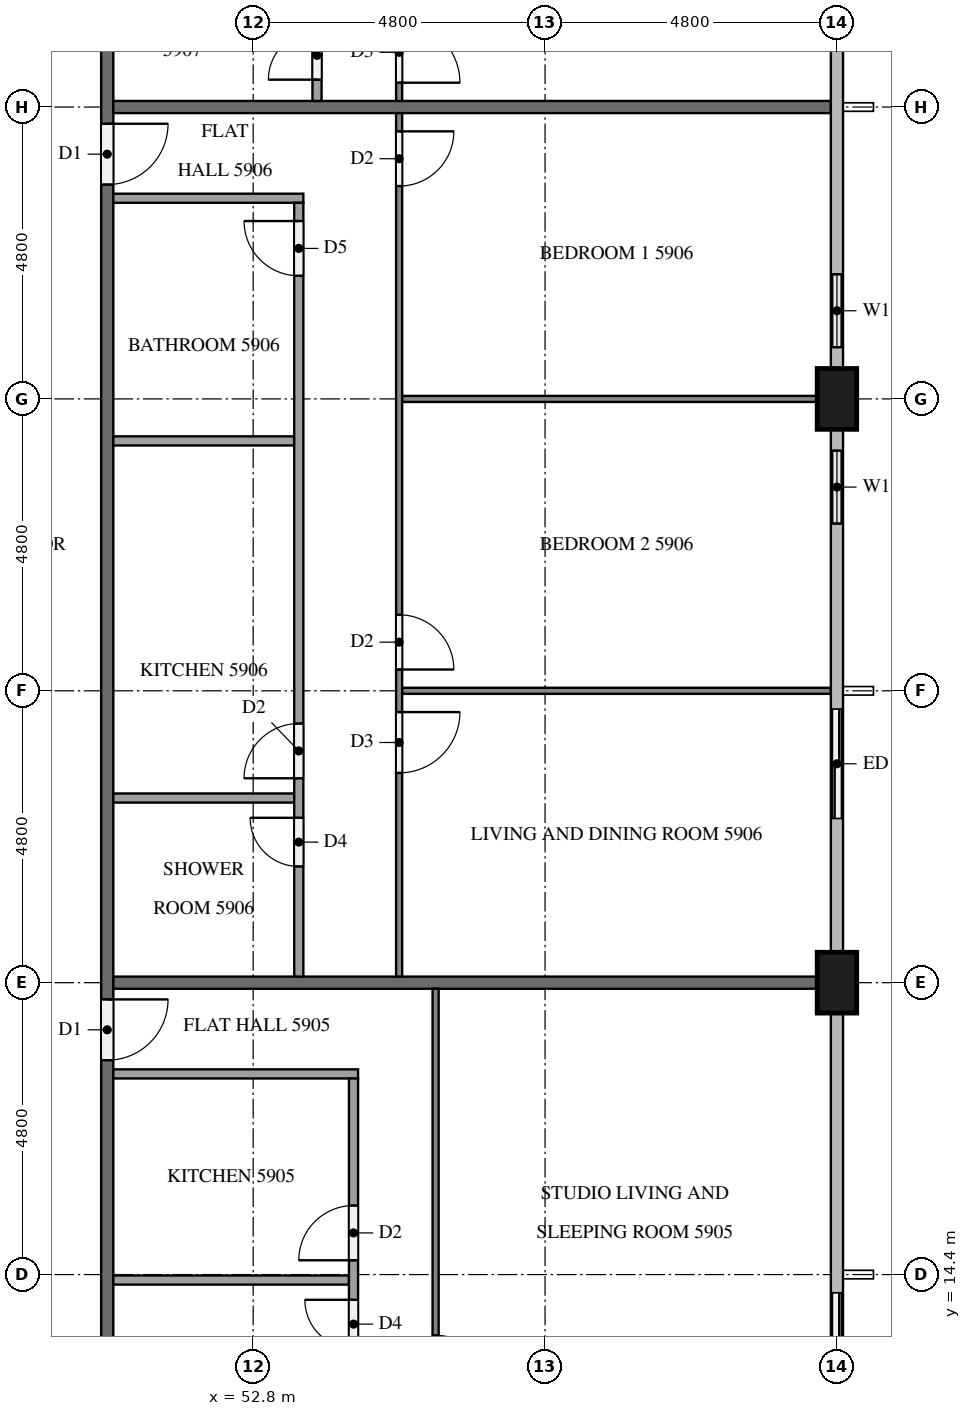
"""IFC4 building model, lengths in metres.
Left out: names, types, materials, properties, quantities, classifications, styles, units other than length and angle.
Written with IfcOpenShell. Run it as: python <this file> out.ifc"""

import sys

from ifc_helpers import new_model, si_unit, direction, frame, frame_2d, origin, origin_2d, place, context, subcontext, project, spatial, rectangle, extrude, element, fill, save


model = new_model("IFC4")
c1 = context("Model", 3, precision=1e-05, world=origin(), true_north=direction((0.0, 1.0)))
c2 = subcontext(c1, "Body", "Model", "MODEL_VIEW")
j1 = project(units=[si_unit("LENGTHUNIT", "METRE"), si_unit("PLANEANGLEUNIT", "RADIAN")], contexts=[c1])
p1 = place(None, origin())
s1 = spatial("IfcSite", under=j1, at=p1, CompositionType="ELEMENT")
p2 = place(p1, origin())
s2 = spatial("IfcBuilding", under=s1, at=p2, CompositionType="ELEMENT")
p3 = place(p2, frame((0.0, 0.0, 226.3)))
s3 = spatial("IfcBuildingStorey", under=s2, at=p3, CompositionType="ELEMENT", Elevation=226.3)
for number, where, z_axis, x_axis in (
    (1, (62.4, 19.2, 0.0), (0.0, 0.0, 1.0), (0.0, 1.0, 0.0)),
    (2, (62.4, 28.8, 0.0), (0.0, 0.0, 1.0), (0.0, 1.0, 0.0)),
):
    element("IfcColumn", number, at=place(p3, frame(where, z_axis=z_axis, x_axis=x_axis)), inside=s3, PredefinedType="COLUMN", context=c2, shape_type="SweptSolid", body=[
        extrude(rectangle(XDim=1.0, YDim=0.65, at=origin_2d()), origin(), (0.0, 0.0, 1.0), 3.2),
    ])
p4 = place(p3, frame((62.4, 12.0, 0.0), z_axis=(0.0, 0.0, 1.0), x_axis=(0.0, 1.0, 0.0)))
e3 = element("IfcWall", 3, at=p4, inside=s3, PredefinedType="SOLIDWALL", context=c2, shape_type="SweptSolid", body=[
    extrude(rectangle(XDim=2.4, YDim=0.15, at=frame_2d((1.2, 0.0))), origin(), (0.0, 0.0, 1.0), 3.2),
])
p5 = place(p4, frame((0.3, 0.0, 0.0)))
e4 = element("IfcOpeningElement", 4, at=p5, cuts=e3, PredefinedType="OPENING", context=c2, shape_type="SweptSolid", body=[
    extrude(rectangle(XDim=1.8, YDim=2.4, at=frame_2d((0.9, 1.2))), frame((0.0, 0.085, 0.0), z_axis=(0.0, -1.0, 0.0), x_axis=(1.0, 0.0, 0.0)), (0.0, 0.0, 1.0), 0.17),
])
p6 = place(p3, frame((62.4, 21.6, 0.0), z_axis=(0.0, 0.0, 1.0), x_axis=(0.0, 1.0, 0.0)))
e5 = element("IfcWall", 5, at=p6, inside=s3, PredefinedType="SOLIDWALL", context=c2, shape_type="SweptSolid", body=[
    extrude(rectangle(XDim=2.4, YDim=0.15, at=frame_2d((1.2, 0.0))), origin(), (0.0, 0.0, 1.0), 3.2),
])
p7 = place(p6, frame((0.3, 0.0, 0.0)))
e6 = element("IfcOpeningElement", 6, at=p7, cuts=e5, PredefinedType="OPENING", context=c2, shape_type="SweptSolid", body=[
    extrude(rectangle(XDim=1.8, YDim=2.4, at=frame_2d((0.9, 1.2))), frame((0.0, 0.085, 0.0), z_axis=(0.0, -1.0, 0.0), x_axis=(1.0, 0.0, 0.0)), (0.0, 0.0, 1.0), 0.17),
])
p8 = place(p3, frame((62.4, 26.4, 0.0), z_axis=(0.0, 0.0, 1.0), x_axis=(0.0, 1.0, 0.0)))
e7 = element("IfcWall", 7, at=p8, inside=s3, PredefinedType="SOLIDWALL", context=c2, shape_type="SweptSolid", body=[
    extrude(rectangle(XDim=1.9, YDim=0.15, at=frame_2d((0.95, 0.0))), origin(), (0.0, 0.0, 1.0), 3.2),
])
p9 = place(p8, frame((0.35, 0.0, 0.9)))
e8 = element("IfcOpeningElement", 8, at=p9, cuts=e7, PredefinedType="OPENING", context=c2, shape_type="SweptSolid", body=[
    extrude(rectangle(XDim=1.2, YDim=1.4, at=frame_2d((0.6, 0.7))), frame((0.0, 0.085, 0.0), z_axis=(0.0, -1.0, 0.0), x_axis=(1.0, 0.0, 0.0)), (0.0, 0.0, 1.0), 0.17),
])
p10 = place(p3, frame((62.4, 29.3, 0.0), z_axis=(0.0, 0.0, 1.0), x_axis=(0.0, 1.0, 0.0)))
e9 = element("IfcWall", 9, at=p10, inside=s3, PredefinedType="SOLIDWALL", context=c2, shape_type="SweptSolid", body=[
    extrude(rectangle(XDim=1.9, YDim=0.15, at=frame_2d((0.95, 0.0))), origin(), (0.0, 0.0, 1.0), 3.2),
])
p11 = place(p10, frame((0.35, 0.0, 0.9)))
e10 = element("IfcOpeningElement", 10, at=p11, cuts=e9, PredefinedType="OPENING", context=c2, shape_type="SweptSolid", body=[
    extrude(rectangle(XDim=1.2, YDim=1.4, at=frame_2d((0.6, 0.7))), frame((0.0, 0.085, 0.0), z_axis=(0.0, -1.0, 0.0), x_axis=(1.0, 0.0, 0.0)), (0.0, 0.0, 1.0), 0.17),
])
p12 = place(p3, frame((50.4, 40.7, 0.0), z_axis=(0.0, 0.0, 1.0), x_axis=(0.0, -1.0, 0.0)))
e11 = element("IfcWall", 11, at=p12, inside=s3, PredefinedType="PARTITIONING", context=c2, shape_type="SweptSolid", body=[
    extrude(rectangle(XDim=28.6, YDim=0.2, at=frame_2d((14.3, 0.0))), origin(), (0.0, 0.0, 1.0), 3.2),
])
p13 = place(p12, frame((21.775, 0.0, 0.0)))
e12 = element("IfcOpeningElement", 12, at=p13, cuts=e11, PredefinedType="OPENING", context=c2, shape_type="SweptSolid", body=[
    extrude(rectangle(XDim=1.0, YDim=2.1, at=frame_2d((0.5, 1.05))), frame((0.0, 0.11, 0.0), z_axis=(0.0, -1.0, 0.0), x_axis=(1.0, 0.0, 0.0)), (0.0, 0.0, 1.0), 0.22),
])
p14 = place(p12, frame((7.375, 0.0, 0.0)))
e13 = element("IfcOpeningElement", 13, at=p14, cuts=e11, PredefinedType="OPENING", context=c2, shape_type="SweptSolid", body=[
    extrude(rectangle(XDim=1.0, YDim=2.1, at=frame_2d((0.5, 1.05))), frame((0.0, 0.11, 0.0), z_axis=(0.0, -1.0, 0.0), x_axis=(1.0, 0.0, 0.0)), (0.0, 0.0, 1.0), 0.22),
])
p15 = place(p12, frame((0.175, 0.0, 0.0)))
e14 = element("IfcOpeningElement", 14, at=p15, cuts=e11, PredefinedType="OPENING", context=c2, shape_type="SweptSolid", body=[
    extrude(rectangle(XDim=1.0, YDim=2.1, at=frame_2d((0.5, 1.05))), frame((0.0, 0.11, 0.0), z_axis=(0.0, -1.0, 0.0), x_axis=(1.0, 0.0, 0.0)), (0.0, 0.0, 1.0), 0.22),
])
p16 = place(p3, frame((50.5, 19.2, 0.0), z_axis=(0.0, 0.0, 1.0), x_axis=(1.0, 0.0, 0.0)))
e15 = element("IfcWall", 15, at=p16, inside=s3, PredefinedType="PARTITIONING", context=c2, shape_type="SweptSolid", body=[
    extrude(rectangle(XDim=11.575, YDim=0.2, at=frame_2d((5.788, 0.0))), origin(), (0.0, 0.0, 1.0), 3.2),
])
p17 = place(p3, frame((50.5, 33.6, 0.0), z_axis=(0.0, 0.0, 1.0), x_axis=(1.0, 0.0, 0.0)))
e16 = element("IfcWall", 16, at=p17, inside=s3, PredefinedType="PARTITIONING", context=c2, shape_type="SweptSolid", body=[
    extrude(rectangle(XDim=11.8, YDim=0.2, at=frame_2d((5.9, 0.0))), origin(), (0.0, 0.0, 1.0), 3.2),
])
p18 = place(p3, frame((55.8, 19.1, 0.0), z_axis=(0.0, 0.0, 1.0), x_axis=(0.0, -1.0, 0.0)))
e17 = element("IfcWall", 17, at=p18, inside=s3, PredefinedType="PARTITIONING", context=c2, shape_type="SweptSolid", body=[
    extrude(rectangle(XDim=7.0, YDim=0.1, at=frame_2d((3.5, 0.0))), origin(), (0.0, 0.0, 1.0), 3.2),
])
p19 = place(p18, frame((5.7, 0.0, 0.0)))
e18 = element("IfcOpeningElement", 18, at=p19, cuts=e17, PredefinedType="OPENING", context=c2, shape_type="SweptSolid", body=[
    extrude(rectangle(XDim=1.0, YDim=2.1, at=frame_2d((0.5, 1.05))), frame((0.0, 0.06, 0.0), z_axis=(0.0, -1.0, 0.0), x_axis=(1.0, 0.0, 0.0)), (0.0, 0.0, 1.0), 0.12),
])
p20 = place(p3, frame((50.5, 14.31, 0.0), z_axis=(0.0, 0.0, 1.0), x_axis=(1.0, 0.0, 0.0)))
e19 = element("IfcWall", 19, at=p20, inside=s3, PredefinedType="PARTITIONING", context=c2, shape_type="SweptSolid", body=[
    extrude(rectangle(XDim=3.875, YDim=0.15, at=frame_2d((1.938, 0.0))), origin(), (0.0, 0.0, 1.0), 3.2),
])
p21 = place(p3, frame((50.5, 17.7, 0.0), z_axis=(0.0, 0.0, 1.0), x_axis=(1.0, 0.0, 0.0)))
e20 = element("IfcWall", 20, at=p21, inside=s3, PredefinedType="PARTITIONING", context=c2, shape_type="SweptSolid", body=[
    extrude(rectangle(XDim=4.025, YDim=0.15, at=frame_2d((2.012, 0.0))), origin(), (0.0, 0.0, 1.0), 3.2),
])
p22 = place(p3, frame((54.45, 12.1, 0.0), z_axis=(0.0, 0.0, 1.0), x_axis=(0.0, 1.0, 0.0)))
e21 = element("IfcWall", 21, at=p22, inside=s3, PredefinedType="PARTITIONING", context=c2, shape_type="SweptSolid", body=[
    extrude(rectangle(XDim=5.525, YDim=0.15, at=frame_2d((2.762, 0.0))), origin(), (0.0, 0.0, 1.0), 3.2),
])
p23 = place(p22, frame((2.535, 0.0, 0.0)))
e22 = element("IfcOpeningElement", 22, at=p23, cuts=e21, PredefinedType="OPENING", context=c2, shape_type="SweptSolid", body=[
    extrude(rectangle(XDim=0.9, YDim=2.1, at=frame_2d((0.45, 1.05))), frame((0.0, 0.085, 0.0), z_axis=(0.0, -1.0, 0.0), x_axis=(1.0, 0.0, 0.0)), (0.0, 0.0, 1.0), 0.17),
])
p24 = place(p22, frame((1.085, 0.0, 0.0)))
e23 = element("IfcOpeningElement", 23, at=p24, cuts=e21, PredefinedType="OPENING", context=c2, shape_type="SweptSolid", body=[
    extrude(rectangle(XDim=0.8, YDim=2.1, at=frame_2d((0.4, 1.05))), frame((0.0, 0.085, 0.0), z_axis=(0.0, -1.0, 0.0), x_axis=(1.0, 0.0, 0.0)), (0.0, 0.0, 1.0), 0.17),
])
p25 = place(p3, frame((55.25, 28.8, 0.0), z_axis=(0.0, 0.0, 1.0), x_axis=(1.0, 0.0, 0.0)))
e24 = element("IfcWall", 24, at=p25, inside=s3, PredefinedType="PARTITIONING", context=c2, shape_type="SweptSolid", body=[
    extrude(rectangle(XDim=6.825, YDim=0.1, at=frame_2d((3.413, 0.0))), origin(), (0.0, 0.0, 1.0), 3.2),
])
p26 = place(p3, frame((55.25, 24.0, 0.0), z_axis=(0.0, 0.0, 1.0), x_axis=(1.0, 0.0, 0.0)))
e25 = element("IfcWall", 25, at=p26, inside=s3, PredefinedType="PARTITIONING", context=c2, shape_type="SweptSolid", body=[
    extrude(rectangle(XDim=7.05, YDim=0.1, at=frame_2d((3.525, 0.0))), origin(), (0.0, 0.0, 1.0), 3.2),
])
p27 = place(p3, frame((55.2, 33.5, 0.0), z_axis=(0.0, 0.0, 1.0), x_axis=(0.0, -1.0, 0.0)))
e26 = element("IfcWall", 26, at=p27, inside=s3, PredefinedType="PARTITIONING", context=c2, shape_type="SweptSolid", body=[
    extrude(rectangle(XDim=14.2, YDim=0.1, at=frame_2d((7.1, 0.0))), origin(), (0.0, 0.0, 1.0), 3.2),
])
p28 = place(p27, frame((0.3, 0.0, 0.0)))
e27 = element("IfcOpeningElement", 27, at=p28, cuts=e26, PredefinedType="OPENING", context=c2, shape_type="SweptSolid", body=[
    extrude(rectangle(XDim=0.9, YDim=2.1, at=frame_2d((0.45, 1.05))), frame((0.0, 0.06, 0.0), z_axis=(0.0, -1.0, 0.0), x_axis=(1.0, 0.0, 0.0)), (0.0, 0.0, 1.0), 0.12),
])
p29 = place(p27, frame((8.25, 0.0, 0.0)))
e28 = element("IfcOpeningElement", 28, at=p29, cuts=e26, PredefinedType="OPENING", context=c2, shape_type="SweptSolid", body=[
    extrude(rectangle(XDim=0.9, YDim=2.1, at=frame_2d((0.45, 1.05))), frame((0.0, 0.06, 0.0), z_axis=(0.0, -1.0, 0.0), x_axis=(1.0, 0.0, 0.0)), (0.0, 0.0, 1.0), 0.12),
])
p30 = place(p27, frame((9.85, 0.0, 0.0)))
e29 = element("IfcOpeningElement", 29, at=p30, cuts=e26, PredefinedType="OPENING", context=c2, shape_type="SweptSolid", body=[
    extrude(rectangle(XDim=1.0, YDim=2.1, at=frame_2d((0.5, 1.05))), frame((0.0, 0.06, 0.0), z_axis=(0.0, -1.0, 0.0), x_axis=(1.0, 0.0, 0.0)), (0.0, 0.0, 1.0), 0.12),
])
for number, where, z_axis, x_axis in (
    (30, (50.5, 28.11, 0.0), (0.0, 0.0, 1.0), (1.0, 0.0, 0.0)),
    (31, (50.5, 22.237, 0.0), (0.0, 0.0, 1.0), (1.0, 0.0, 0.0)),
):
    element("IfcWall", number, at=place(p3, frame(where, z_axis=z_axis, x_axis=x_axis)), inside=s3, PredefinedType="PARTITIONING", context=c2, shape_type="SweptSolid", body=[
        extrude(rectangle(XDim=2.975, YDim=0.15, at=frame_2d((1.488, 0.0))), origin(), (0.0, 0.0, 1.0), 3.2),
    ])
p31 = place(p3, frame((50.5, 32.1, 0.0), z_axis=(0.0, 0.0, 1.0), x_axis=(1.0, 0.0, 0.0)))
e32 = element("IfcWall", 32, at=p31, inside=s3, PredefinedType="PARTITIONING", context=c2, shape_type="SweptSolid", body=[
    extrude(rectangle(XDim=3.125, YDim=0.15, at=frame_2d((1.562, 0.0))), origin(), (0.0, 0.0, 1.0), 3.2),
])
p32 = place(p3, frame((53.55, 19.3, 0.0), z_axis=(0.0, 0.0, 1.0), x_axis=(0.0, 1.0, 0.0)))
e33 = element("IfcWall", 33, at=p32, inside=s3, PredefinedType="PARTITIONING", context=c2, shape_type="SweptSolid", body=[
    extrude(rectangle(XDim=12.725, YDim=0.15, at=frame_2d((6.362, 0.0))), origin(), (0.0, 0.0, 1.0), 3.2),
])
p33 = place(p32, frame((11.525, 0.0, 0.0)))
e34 = element("IfcOpeningElement", 34, at=p33, cuts=e33, PredefinedType="OPENING", context=c2, shape_type="SweptSolid", body=[
    extrude(rectangle(XDim=0.9, YDim=2.1, at=frame_2d((0.45, 1.05))), frame((0.0, 0.085, 0.0), z_axis=(0.0, -1.0, 0.0), x_axis=(1.0, 0.0, 0.0)), (0.0, 0.0, 1.0), 0.17),
])
p34 = place(p32, frame((3.261, 0.0, 0.0)))
e35 = element("IfcOpeningElement", 35, at=p34, cuts=e33, PredefinedType="OPENING", context=c2, shape_type="SweptSolid", body=[
    extrude(rectangle(XDim=0.9, YDim=2.1, at=frame_2d((0.45, 1.05))), frame((0.0, 0.085, 0.0), z_axis=(0.0, -1.0, 0.0), x_axis=(1.0, 0.0, 0.0)), (0.0, 0.0, 1.0), 0.17),
])
p35 = place(p32, frame((1.812, 0.0, 0.0)))
e36 = element("IfcOpeningElement", 36, at=p35, cuts=e33, PredefinedType="OPENING", context=c2, shape_type="SweptSolid", body=[
    extrude(rectangle(XDim=0.8, YDim=2.1, at=frame_2d((0.4, 1.05))), frame((0.0, 0.085, 0.0), z_axis=(0.0, -1.0, 0.0), x_axis=(1.0, 0.0, 0.0)), (0.0, 0.0, 1.0), 0.17),
])
p36 = place(p3, frame((55.2, 40.7, 0.0), z_axis=(0.0, 0.0, 1.0), x_axis=(0.0, -1.0, 0.0)))
e37 = element("IfcWall", 37, at=p36, inside=s3, PredefinedType="PARTITIONING", context=c2, shape_type="SweptSolid", body=[
    extrude(rectangle(XDim=7.0, YDim=0.1, at=frame_2d((3.5, 0.0))), origin(), (0.0, 0.0, 1.0), 3.2),
])
p37 = place(p36, frame((5.7, 0.0, 0.0)))
e38 = element("IfcOpeningElement", 38, at=p37, cuts=e37, PredefinedType="OPENING", context=c2, shape_type="SweptSolid", body=[
    extrude(rectangle(XDim=1.0, YDim=2.1, at=frame_2d((0.5, 1.05))), frame((0.0, 0.06, 0.0), z_axis=(0.0, -1.0, 0.0), x_axis=(1.0, 0.0, 0.0)), (0.0, 0.0, 1.0), 0.12),
])
p38 = place(p3, frame((53.85, 33.7, 0.0), z_axis=(0.0, 0.0, 1.0), x_axis=(0.0, 1.0, 0.0)))
e39 = element("IfcWall", 39, at=p38, inside=s3, PredefinedType="PARTITIONING", context=c2, shape_type="SweptSolid", body=[
    extrude(rectangle(XDim=5.525, YDim=0.15, at=frame_2d((2.763, 0.0))), origin(), (0.0, 0.0, 1.0), 3.2),
])
p39 = place(p38, frame((4.325, 0.0, 0.0)))
e40 = element("IfcOpeningElement", 40, at=p39, cuts=e39, PredefinedType="OPENING", context=c2, shape_type="SweptSolid", body=[
    extrude(rectangle(XDim=0.9, YDim=2.1, at=frame_2d((0.45, 1.05))), frame((0.0, 0.085, 0.0), z_axis=(0.0, -1.0, 0.0), x_axis=(1.0, 0.0, 0.0)), (0.0, 0.0, 1.0), 0.17),
])
p40 = place(p38, frame((0.35, 0.0, 0.0)))
e41 = element("IfcOpeningElement", 41, at=p40, cuts=e39, PredefinedType="OPENING", context=c2, shape_type="SweptSolid", body=[
    extrude(rectangle(XDim=0.8, YDim=2.1, at=frame_2d((0.4, 1.05))), frame((0.0, 0.085, 0.0), z_axis=(0.0, -1.0, 0.0), x_axis=(1.0, 0.0, 0.0)), (0.0, 0.0, 1.0), 0.17),
])
p41 = place(p5, origin())
e42 = element("IfcDoor", 42, at=p41, inside=s3, OperationType="SLIDING_TO_LEFT", PredefinedType="DOOR", context=c2, shape_type="SweptSolid", body=[
    extrude(rectangle(XDim=1.8, YDim=2.4, at=frame_2d((0.9, 1.2))), frame((0.0, 0.025, 0.0), z_axis=(0.0, -1.0, 0.0), x_axis=(1.0, 0.0, 0.0)), (0.0, 0.0, 1.0), 0.05),
])
fill(e4, e42)
p42 = place(p7, origin())
e43 = element("IfcDoor", 43, at=p42, inside=s3, OperationType="SLIDING_TO_RIGHT", PredefinedType="DOOR", context=c2, shape_type="SweptSolid", body=[
    extrude(rectangle(XDim=1.8, YDim=2.4, at=frame_2d((0.9, 1.2))), frame((0.0, 0.025, 0.0), z_axis=(0.0, -1.0, 0.0), x_axis=(1.0, 0.0, 0.0)), (0.0, 0.0, 1.0), 0.05),
])
fill(e6, e43)
p43 = place(p9, origin())
e44 = element("IfcWindow", 44, at=p43, inside=s3, PartitioningType="SINGLE_PANEL", PredefinedType="WINDOW", context=c2, shape_type="SweptSolid", body=[
    extrude(rectangle(XDim=1.2, YDim=1.4, at=frame_2d((0.6, 0.7))), frame((0.0, 0.03, 0.0), z_axis=(0.0, -1.0, 0.0), x_axis=(1.0, 0.0, 0.0)), (0.0, 0.0, 1.0), 0.06),
])
fill(e8, e44)
p44 = place(p11, origin())
e45 = element("IfcWindow", 45, at=p44, inside=s3, PartitioningType="SINGLE_PANEL", PredefinedType="WINDOW", context=c2, shape_type="SweptSolid", body=[
    extrude(rectangle(XDim=1.2, YDim=1.4, at=frame_2d((0.6, 0.7))), frame((0.0, 0.03, 0.0), z_axis=(0.0, -1.0, 0.0), x_axis=(1.0, 0.0, 0.0)), (0.0, 0.0, 1.0), 0.06),
])
fill(e10, e45)
p45 = place(p13, origin())
e46 = element("IfcDoor", 46, at=p45, inside=s3, OperationType="SINGLE_SWING_LEFT", PredefinedType="DOOR", context=c2, shape_type="SweptSolid", body=[
    extrude(rectangle(XDim=1.0, YDim=2.1, at=frame_2d((0.5, 1.05))), frame((0.0, 0.025, 0.0), z_axis=(0.0, -1.0, 0.0), x_axis=(1.0, 0.0, 0.0)), (0.0, 0.0, 1.0), 0.05),
])
fill(e12, e46)
p46 = place(p14, origin())
e47 = element("IfcDoor", 47, at=p46, inside=s3, OperationType="SINGLE_SWING_LEFT", PredefinedType="DOOR", context=c2, shape_type="SweptSolid", body=[
    extrude(rectangle(XDim=1.0, YDim=2.1, at=frame_2d((0.5, 1.05))), frame((0.0, 0.025, 0.0), z_axis=(0.0, -1.0, 0.0), x_axis=(1.0, 0.0, 0.0)), (0.0, 0.0, 1.0), 0.05),
])
fill(e13, e47)
p47 = place(p19, origin())
e48 = element("IfcDoor", 48, at=p47, inside=s3, OperationType="SINGLE_SWING_RIGHT", PredefinedType="DOOR", context=c2, shape_type="SweptSolid", body=[
    extrude(rectangle(XDim=1.0, YDim=2.1, at=frame_2d((0.5, 1.05))), frame((0.0, 0.025, 0.0), z_axis=(0.0, -1.0, 0.0), x_axis=(1.0, 0.0, 0.0)), (0.0, 0.0, 1.0), 0.05),
])
fill(e18, e48)
p48 = place(p23, origin())
e49 = element("IfcDoor", 49, at=p48, inside=s3, OperationType="SINGLE_SWING_LEFT", PredefinedType="DOOR", context=c2, shape_type="SweptSolid", body=[
    extrude(rectangle(XDim=0.9, YDim=2.1, at=frame_2d((0.45, 1.05))), frame((0.0, 0.025, 0.0), z_axis=(0.0, -1.0, 0.0), x_axis=(1.0, 0.0, 0.0)), (0.0, 0.0, 1.0), 0.05),
])
fill(e22, e49)
p49 = place(p24, origin())
e50 = element("IfcDoor", 50, at=p49, inside=s3, OperationType="SINGLE_SWING_RIGHT", PredefinedType="DOOR", context=c2, shape_type="SweptSolid", body=[
    extrude(rectangle(XDim=0.8, YDim=2.1, at=frame_2d((0.4, 1.05))), frame((0.0, 0.025, 0.0), z_axis=(0.0, -1.0, 0.0), x_axis=(1.0, 0.0, 0.0)), (0.0, 0.0, 1.0), 0.05),
])
fill(e23, e50)
p50 = place(p28, origin())
e51 = element("IfcDoor", 51, at=p50, inside=s3, OperationType="SINGLE_SWING_LEFT", PredefinedType="DOOR", context=c2, shape_type="SweptSolid", body=[
    extrude(rectangle(XDim=0.9, YDim=2.1, at=frame_2d((0.45, 1.05))), frame((0.0, 0.025, 0.0), z_axis=(0.0, -1.0, 0.0), x_axis=(1.0, 0.0, 0.0)), (0.0, 0.0, 1.0), 0.05),
])
fill(e27, e51)
p51 = place(p29, origin())
e52 = element("IfcDoor", 52, at=p51, inside=s3, OperationType="SINGLE_SWING_RIGHT", PredefinedType="DOOR", context=c2, shape_type="SweptSolid", body=[
    extrude(rectangle(XDim=0.9, YDim=2.1, at=frame_2d((0.45, 1.05))), frame((0.0, 0.025, 0.0), z_axis=(0.0, -1.0, 0.0), x_axis=(1.0, 0.0, 0.0)), (0.0, 0.0, 1.0), 0.05),
])
fill(e28, e52)
p52 = place(p30, origin())
e53 = element("IfcDoor", 53, at=p52, inside=s3, OperationType="SINGLE_SWING_LEFT", PredefinedType="DOOR", context=c2, shape_type="SweptSolid", body=[
    extrude(rectangle(XDim=1.0, YDim=2.1, at=frame_2d((0.5, 1.05))), frame((0.0, 0.025, 0.0), z_axis=(0.0, -1.0, 0.0), x_axis=(1.0, 0.0, 0.0)), (0.0, 0.0, 1.0), 0.05),
])
fill(e29, e53)
p53 = place(p33, origin())
e54 = element("IfcDoor", 54, at=p53, inside=s3, OperationType="SINGLE_SWING_RIGHT", PredefinedType="DOOR", context=c2, shape_type="SweptSolid", body=[
    extrude(rectangle(XDim=0.9, YDim=2.1, at=frame_2d((0.45, 1.05))), frame((0.0, 0.025, 0.0), z_axis=(0.0, -1.0, 0.0), x_axis=(1.0, 0.0, 0.0)), (0.0, 0.0, 1.0), 0.05),
])
fill(e34, e54)
p54 = place(p34, origin())
e55 = element("IfcDoor", 55, at=p54, inside=s3, OperationType="SINGLE_SWING_LEFT", PredefinedType="DOOR", context=c2, shape_type="SweptSolid", body=[
    extrude(rectangle(XDim=0.9, YDim=2.1, at=frame_2d((0.45, 1.05))), frame((0.0, 0.025, 0.0), z_axis=(0.0, -1.0, 0.0), x_axis=(1.0, 0.0, 0.0)), (0.0, 0.0, 1.0), 0.05),
])
fill(e35, e55)
p55 = place(p35, origin())
e56 = element("IfcDoor", 56, at=p55, inside=s3, OperationType="SINGLE_SWING_RIGHT", PredefinedType="DOOR", context=c2, shape_type="SweptSolid", body=[
    extrude(rectangle(XDim=0.8, YDim=2.1, at=frame_2d((0.4, 1.05))), frame((0.0, 0.025, 0.0), z_axis=(0.0, -1.0, 0.0), x_axis=(1.0, 0.0, 0.0)), (0.0, 0.0, 1.0), 0.05),
])
fill(e36, e56)
p56 = place(p37, origin())
e57 = element("IfcDoor", 57, at=p56, inside=s3, OperationType="SINGLE_SWING_RIGHT", PredefinedType="DOOR", context=c2, shape_type="SweptSolid", body=[
    extrude(rectangle(XDim=1.0, YDim=2.1, at=frame_2d((0.5, 1.05))), frame((0.0, 0.025, 0.0), z_axis=(0.0, -1.0, 0.0), x_axis=(1.0, 0.0, 0.0)), (0.0, 0.0, 1.0), 0.05),
])
fill(e38, e57)
p57 = place(p40, origin())
e58 = element("IfcDoor", 58, at=p57, inside=s3, OperationType="SINGLE_SWING_LEFT", PredefinedType="DOOR", context=c2, shape_type="SweptSolid", body=[
    extrude(rectangle(XDim=0.8, YDim=2.1, at=frame_2d((0.4, 1.05))), frame((0.0, 0.025, 0.0), z_axis=(0.0, -1.0, 0.0), x_axis=(1.0, 0.0, 0.0)), (0.0, 0.0, 1.0), 0.05),
])
fill(e41, e58)
save(model, sys.argv[1])
